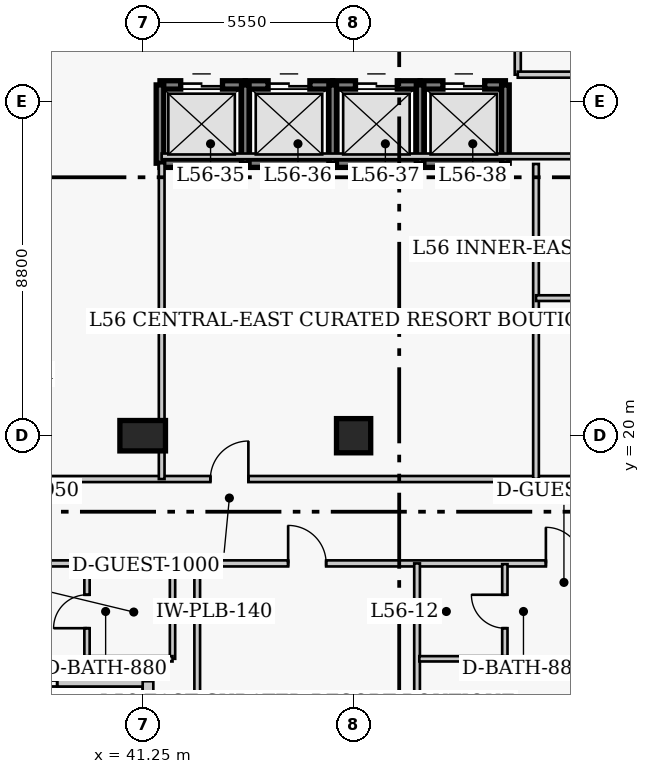
"""IFC4 building model, lengths in metres.
Left out: names, types, materials, properties, quantities, classifications, styles, units other than length and angle.
Written with IfcOpenShell. Run it as: python <this file> out.ifc"""

import sys

from ifc_helpers import new_model, si_unit, direction, frame, frame_2d, origin, origin_2d, place, context, subcontext, project, spatial, rectangle, extrude, element, fill, save


model = new_model("IFC4")
c1 = context("Model", 3, precision=1e-05, world=origin(), true_north=direction((0.0, 1.0)))
c2 = subcontext(c1, "Body", "Model", "MODEL_VIEW")
j1 = project(units=[si_unit("LENGTHUNIT", "METRE"), si_unit("PLANEANGLEUNIT", "RADIAN")], contexts=[c1])
p1 = place(None, origin())
s1 = spatial("IfcSite", under=j1, at=p1, CompositionType="ELEMENT")
p2 = place(p1, origin())
s2 = spatial("IfcBuilding", under=s1, at=p2, CompositionType="ELEMENT")
p3 = place(p2, frame((0.0, 0.0, 224.1)))
s3 = spatial("IfcBuildingStorey", under=s2, at=p3, CompositionType="ELEMENT", Elevation=224.1)
p4 = place(p3, frame((41.25, 20.0, 0.0), z_axis=(0.0, 0.0, 1.0), x_axis=(1.0, 0.0, 0.0)))
e1 = element("IfcColumn", 1, at=p4, inside=s3, PredefinedType="COLUMN", context=c2, shape_type="SweptSolid", body=[
    extrude(rectangle(XDim=1.2, YDim=0.8, at=origin_2d()), origin(), (0.0, 0.0, 1.0), 3.9),
])
p5 = place(p3, frame((46.8, 20.0, 0.0), z_axis=(0.0, 0.0, 1.0), x_axis=(1.0, 0.0, 0.0)))
e2 = element("IfcColumn", 2, at=p5, inside=s3, PredefinedType="COLUMN", context=c2, shape_type="SweptSolid", body=[
    extrude(rectangle(XDim=0.9, YDim=0.9, at=origin_2d()), origin(), (0.0, 0.0, 1.0), 3.9),
])
p6 = place(p3, frame((36.61, 13.54, 0.0), z_axis=(0.0, 0.0, 1.0), x_axis=(1.0, 0.0, 0.0)))
e3 = element("IfcWall", 3, at=p6, inside=s3, PredefinedType="SOLIDWALL", context=c2, shape_type="SweptSolid", body=[
    extrude(rectangle(XDim=4.78, YDim=0.28, at=frame_2d((2.39, 0.0))), origin(), (0.0, 0.0, 1.0), 3.65),
])
p7 = place(p6, frame((1.09, 0.0, 0.85)))
e4 = element("IfcOpeningElement", 4, at=p7, cuts=e3, PredefinedType="OPENING", context=c2, shape_type="SweptSolid", body=[
    extrude(rectangle(XDim=1.3, YDim=1.7, at=frame_2d((0.65, 0.85))), frame((0.0, 0.15, 0.0), z_axis=(0.0, -1.0, 0.0), x_axis=(1.0, 0.0, 0.0)), (0.0, 0.0, 1.0), 0.3),
])
p8 = place(p3, frame((41.39, 13.54, 0.0), z_axis=(0.0, 0.0, 1.0), x_axis=(0.0, -1.0, 0.0)))
e5 = element("IfcWall", 5, at=p8, inside=s3, PredefinedType="SOLIDWALL", context=c2, shape_type="SweptSolid", body=[
    extrude(rectangle(XDim=3.18, YDim=0.28, at=frame_2d((1.59, 0.0))), origin(), (0.0, 0.0, 1.0), 3.65),
])
p9 = place(p8, frame((0.94, 0.0, 0.85)))
e6 = element("IfcOpeningElement", 6, at=p9, cuts=e5, PredefinedType="OPENING", context=c2, shape_type="SweptSolid", body=[
    extrude(rectangle(XDim=1.3, YDim=1.7, at=frame_2d((0.65, 0.85))), frame((0.0, 0.15, 0.0), z_axis=(0.0, -1.0, 0.0), x_axis=(1.0, 0.0, 0.0)), (0.0, 0.0, 1.0), 0.3),
])
p10 = place(p3, frame((41.705, 29.23, 0.0), z_axis=(0.0, 0.0, 1.0), x_axis=(1.0, 0.0, 0.0)))
e7 = element("IfcWall", 7, at=p10, inside=s3, PredefinedType="SHEAR", context=c2, shape_type="SweptSolid", body=[
    extrude(rectangle(XDim=2.245, YDim=0.22, at=frame_2d((1.123, 0.0))), origin(), (0.0, 0.0, 1.0), 3.9),
])
p11 = place(p10, frame((0.545, 0.0, 0.0)))
e8 = element("IfcOpeningElement", 8, at=p11, cuts=e7, PredefinedType="OPENING", context=c2, shape_type="SweptSolid", body=[
    extrude(rectangle(XDim=1.1, YDim=2.15, at=frame_2d((0.55, 1.075))), frame((0.0, 0.12, 0.0), z_axis=(0.0, -1.0, 0.0), x_axis=(1.0, 0.0, 0.0)), (0.0, 0.0, 1.0), 0.24),
])
p12 = place(p3, frame((41.705, 27.17, 0.0), z_axis=(0.0, 0.0, 1.0), x_axis=(1.0, 0.0, 0.0)))
e9 = element("IfcWall", 9, at=p12, inside=s3, PredefinedType="SHEAR", context=c2, shape_type="SweptSolid", body=[
    extrude(rectangle(XDim=2.245, YDim=0.22, at=frame_2d((1.123, 0.0))), origin(), (0.0, 0.0, 1.0), 3.9),
])
p13 = place(p3, frame((41.705, 27.17, 0.0), z_axis=(0.0, 0.0, 1.0), x_axis=(0.0, 1.0, 0.0)))
e10 = element("IfcWall", 10, at=p13, inside=s3, PredefinedType="SHEAR", context=c2, shape_type="SweptSolid", body=[
    extrude(rectangle(XDim=2.06, YDim=0.2, at=frame_2d((1.03, 0.0))), origin(), (0.0, 0.0, 1.0), 3.9),
])
p14 = place(p3, frame((43.95, 29.23, 0.0), z_axis=(0.0, 0.0, 1.0), x_axis=(1.0, 0.0, 0.0)))
e11 = element("IfcWall", 11, at=p14, inside=s3, PredefinedType="SHEAR", context=c2, shape_type="SweptSolid", body=[
    extrude(rectangle(XDim=2.3, YDim=0.22, at=frame_2d((1.15, 0.0))), origin(), (0.0, 0.0, 1.0), 3.9),
])
p15 = place(p14, frame((0.6, 0.0, 0.0)))
e12 = element("IfcOpeningElement", 12, at=p15, cuts=e11, PredefinedType="OPENING", context=c2, shape_type="SweptSolid", body=[
    extrude(rectangle(XDim=1.1, YDim=2.15, at=frame_2d((0.55, 1.075))), frame((0.0, 0.12, 0.0), z_axis=(0.0, -1.0, 0.0), x_axis=(1.0, 0.0, 0.0)), (0.0, 0.0, 1.0), 0.24),
])
p16 = place(p3, frame((43.95, 27.17, 0.0), z_axis=(0.0, 0.0, 1.0), x_axis=(1.0, 0.0, 0.0)))
e13 = element("IfcWall", 13, at=p16, inside=s3, PredefinedType="SHEAR", context=c2, shape_type="SweptSolid", body=[
    extrude(rectangle(XDim=2.3, YDim=0.22, at=frame_2d((1.15, 0.0))), origin(), (0.0, 0.0, 1.0), 3.9),
])
p17 = place(p3, frame((43.95, 27.17, 0.0), z_axis=(0.0, 0.0, 1.0), x_axis=(0.0, 1.0, 0.0)))
e14 = element("IfcWall", 14, at=p17, inside=s3, PredefinedType="SHEAR", context=c2, shape_type="SweptSolid", body=[
    extrude(rectangle(XDim=2.06, YDim=0.2, at=frame_2d((1.03, 0.0))), origin(), (0.0, 0.0, 1.0), 3.9),
])
p18 = place(p3, frame((46.25, 29.23, 0.0), z_axis=(0.0, 0.0, 1.0), x_axis=(1.0, 0.0, 0.0)))
e15 = element("IfcWall", 15, at=p18, inside=s3, PredefinedType="SHEAR", context=c2, shape_type="SweptSolid", body=[
    extrude(rectangle(XDim=2.3, YDim=0.22, at=frame_2d((1.15, 0.0))), origin(), (0.0, 0.0, 1.0), 3.9),
])
p19 = place(p18, frame((0.6, 0.0, 0.0)))
e16 = element("IfcOpeningElement", 16, at=p19, cuts=e15, PredefinedType="OPENING", context=c2, shape_type="SweptSolid", body=[
    extrude(rectangle(XDim=1.1, YDim=2.15, at=frame_2d((0.55, 1.075))), frame((0.0, 0.12, 0.0), z_axis=(0.0, -1.0, 0.0), x_axis=(1.0, 0.0, 0.0)), (0.0, 0.0, 1.0), 0.24),
])
p20 = place(p3, frame((46.25, 27.17, 0.0), z_axis=(0.0, 0.0, 1.0), x_axis=(1.0, 0.0, 0.0)))
e17 = element("IfcWall", 17, at=p20, inside=s3, PredefinedType="SHEAR", context=c2, shape_type="SweptSolid", body=[
    extrude(rectangle(XDim=2.3, YDim=0.22, at=frame_2d((1.15, 0.0))), origin(), (0.0, 0.0, 1.0), 3.9),
])
p21 = place(p3, frame((46.25, 27.17, 0.0), z_axis=(0.0, 0.0, 1.0), x_axis=(0.0, 1.0, 0.0)))
e18 = element("IfcWall", 18, at=p21, inside=s3, PredefinedType="SHEAR", context=c2, shape_type="SweptSolid", body=[
    extrude(rectangle(XDim=2.06, YDim=0.2, at=frame_2d((1.03, 0.0))), origin(), (0.0, 0.0, 1.0), 3.9),
])
p22 = place(p3, frame((48.55, 29.23, 0.0), z_axis=(0.0, 0.0, 1.0), x_axis=(1.0, 0.0, 0.0)))
e19 = element("IfcWall", 19, at=p22, inside=s3, PredefinedType="SHEAR", context=c2, shape_type="SweptSolid", body=[
    extrude(rectangle(XDim=2.245, YDim=0.22, at=frame_2d((1.123, 0.0))), origin(), (0.0, 0.0, 1.0), 3.9),
])
p23 = place(p22, frame((0.6, 0.0, 0.0)))
e20 = element("IfcOpeningElement", 20, at=p23, cuts=e19, PredefinedType="OPENING", context=c2, shape_type="SweptSolid", body=[
    extrude(rectangle(XDim=1.1, YDim=2.15, at=frame_2d((0.55, 1.075))), frame((0.0, 0.12, 0.0), z_axis=(0.0, -1.0, 0.0), x_axis=(1.0, 0.0, 0.0)), (0.0, 0.0, 1.0), 0.24),
])
p24 = place(p3, frame((48.55, 27.17, 0.0), z_axis=(0.0, 0.0, 1.0), x_axis=(1.0, 0.0, 0.0)))
e21 = element("IfcWall", 21, at=p24, inside=s3, PredefinedType="SHEAR", context=c2, shape_type="SweptSolid", body=[
    extrude(rectangle(XDim=2.245, YDim=0.22, at=frame_2d((1.123, 0.0))), origin(), (0.0, 0.0, 1.0), 3.9),
])
for number, where, z_axis, x_axis in (
    (22, (48.55, 27.17, 0.0), (0.0, 0.0, 1.0), (0.0, 1.0, 0.0)),
    (23, (50.795, 27.17, 0.0), (0.0, 0.0, 1.0), (0.0, 1.0, 0.0)),
):
    element("IfcWall", number, at=place(p3, frame(where, z_axis=z_axis, x_axis=x_axis)), inside=s3, PredefinedType="SHEAR", context=c2, shape_type="SweptSolid", body=[
        extrude(rectangle(XDim=2.06, YDim=0.2, at=frame_2d((1.03, 0.0))), origin(), (0.0, 0.0, 1.0), 3.9),
    ])
p25 = place(p3, frame((51.12, 29.5, 0.0), z_axis=(0.0, 0.0, 1.0), x_axis=(0.0, 1.0, 0.0)))
e24 = element("IfcWall", 24, at=p25, inside=s3, PredefinedType="PARTITIONING", context=c2, shape_type="SweptSolid", body=[
    extrude(rectangle(XDim=3.7, YDim=0.16, at=frame_2d((1.85, 0.0))), origin(), (0.0, 0.0, 1.0), 3.65),
])
p26 = place(p25, frame((0.9, 0.0, 0.0)))
e25 = element("IfcOpeningElement", 25, at=p26, cuts=e24, PredefinedType="OPENING", context=c2, shape_type="SweptSolid", body=[
    extrude(rectangle(XDim=1.1, YDim=2.15, at=frame_2d((0.55, 1.075))), frame((0.0, 0.09, 0.0), z_axis=(0.0, -1.0, 0.0), x_axis=(1.0, 0.0, 0.0)), (0.0, 0.0, 1.0), 0.18),
])
p27 = place(p3, frame((51.12, 29.5, 0.0), z_axis=(0.0, 0.0, 1.0), x_axis=(1.0, 0.0, 0.0)))
e26 = element("IfcWall", 26, at=p27, inside=s3, PredefinedType="PARTITIONING", context=c2, shape_type="SweptSolid", body=[
    extrude(rectangle(XDim=5.63, YDim=0.16, at=frame_2d((2.815, 0.0))), origin(), (0.0, 0.0, 1.0), 3.65),
])
p28 = place(p3, frame((35.85, 18.86, 0.0), z_axis=(0.0, 0.0, 1.0), x_axis=(1.0, 0.0, 0.0)))
e27 = element("IfcWall", 27, at=p28, inside=s3, PredefinedType="PARTITIONING", context=c2, shape_type="SweptSolid", body=[
    extrude(rectangle(XDim=23.15, YDim=0.16, at=frame_2d((11.575, 0.0))), origin(), (0.0, 0.0, 1.0), 3.65),
])
p29 = place(p28, frame((7.181, 0.0, 0.0)))
e28 = element("IfcOpeningElement", 28, at=p29, cuts=e27, PredefinedType="OPENING", context=c2, shape_type="SweptSolid", body=[
    extrude(rectangle(XDim=1.0, YDim=2.15, at=frame_2d((0.5, 1.075))), frame((0.0, 0.09, 0.0), z_axis=(0.0, -1.0, 0.0), x_axis=(1.0, 0.0, 0.0)), (0.0, 0.0, 1.0), 0.18),
])
p30 = place(p28, frame((20.43, 0.0, 0.0)))
e29 = element("IfcOpeningElement", 29, at=p30, cuts=e27, PredefinedType="OPENING", context=c2, shape_type="SweptSolid", body=[
    extrude(rectangle(XDim=1.0, YDim=2.15, at=frame_2d((0.5, 1.075))), frame((0.0, 0.09, 0.0), z_axis=(0.0, -1.0, 0.0), x_axis=(1.0, 0.0, 0.0)), (0.0, 0.0, 1.0), 0.18),
])
p31 = place(p3, frame((35.8, 16.64, 0.0), z_axis=(0.0, 0.0, 1.0), x_axis=(1.0, 0.0, 0.0)))
e30 = element("IfcWall", 30, at=p31, inside=s3, PredefinedType="PARTITIONING", context=c2, shape_type="SweptSolid", body=[
    extrude(rectangle(XDim=23.2, YDim=0.16, at=frame_2d((11.6, 0.0))), origin(), (0.0, 0.0, 1.0), 3.65),
])
p32 = place(p31, frame((1.518, 0.0, 0.0)))
e31 = element("IfcOpeningElement", 31, at=p32, cuts=e30, PredefinedType="OPENING", context=c2, shape_type="SweptSolid", body=[
    extrude(rectangle(XDim=0.95, YDim=2.1, at=frame_2d((0.475, 1.05))), frame((0.0, 0.09, 0.0), z_axis=(0.0, -1.0, 0.0), x_axis=(1.0, 0.0, 0.0)), (0.0, 0.0, 1.0), 0.18),
])
p33 = place(p31, frame((9.278, 0.0, 0.0)))
e32 = element("IfcOpeningElement", 32, at=p33, cuts=e30, PredefinedType="OPENING", context=c2, shape_type="SweptSolid", body=[
    extrude(rectangle(XDim=1.0, YDim=2.15, at=frame_2d((0.5, 1.075))), frame((0.0, 0.09, 0.0), z_axis=(0.0, -1.0, 0.0), x_axis=(1.0, 0.0, 0.0)), (0.0, 0.0, 1.0), 0.18),
])
p34 = place(p31, frame((16.06, 0.0, 0.0)))
e33 = element("IfcOpeningElement", 33, at=p34, cuts=e30, PredefinedType="OPENING", context=c2, shape_type="SweptSolid", body=[
    extrude(rectangle(XDim=0.95, YDim=2.1, at=frame_2d((0.475, 1.05))), frame((0.0, 0.09, 0.0), z_axis=(0.0, -1.0, 0.0), x_axis=(1.0, 0.0, 0.0)), (0.0, 0.0, 1.0), 0.18),
])
p35 = place(p31, frame((18.985, 0.0, 0.0)))
e34 = element("IfcOpeningElement", 34, at=p35, cuts=e30, PredefinedType="OPENING", context=c2, shape_type="SweptSolid", body=[
    extrude(rectangle(XDim=0.95, YDim=2.1, at=frame_2d((0.475, 1.05))), frame((0.0, 0.09, 0.0), z_axis=(0.0, -1.0, 0.0), x_axis=(1.0, 0.0, 0.0)), (0.0, 0.0, 1.0), 0.18),
])
p36 = place(p3, frame((41.75, 18.86, 0.0), z_axis=(0.0, 0.0, 1.0), x_axis=(0.0, 1.0, 0.0)))
e35 = element("IfcWall", 35, at=p36, inside=s3, PredefinedType="PARTITIONING", context=c2, shape_type="SweptSolid", body=[
    extrude(rectangle(XDim=8.31, YDim=0.15, at=frame_2d((4.155, 0.0))), origin(), (0.0, 0.0, 1.0), 3.65),
])
p37 = place(p3, frame((51.6, 18.86, 0.0), z_axis=(0.0, 0.0, 1.0), x_axis=(0.0, 1.0, 0.0)))
e36 = element("IfcWall", 36, at=p37, inside=s3, PredefinedType="PARTITIONING", context=c2, shape_type="SweptSolid", body=[
    extrude(rectangle(XDim=8.29, YDim=0.15, at=frame_2d((4.145, 0.0))), origin(), (0.0, 0.0, 1.0), 3.65),
])
p38 = place(p3, frame((41.75, 27.35, 0.0), z_axis=(0.0, 0.0, 1.0), x_axis=(1.0, 0.0, 0.0)))
e37 = element("IfcWall", 37, at=p38, inside=s3, PredefinedType="PARTITIONING", context=c2, shape_type="SweptSolid", body=[
    extrude(rectangle(XDim=17.19, YDim=0.15, at=frame_2d((8.595, 0.0))), origin(), (0.0, 0.0, 1.0), 3.65),
])
p39 = place(p3, frame((51.6, 23.62, 0.0), z_axis=(0.0, 0.0, 1.0), x_axis=(1.0, 0.0, 0.0)))
e38 = element("IfcWall", 38, at=p39, inside=s3, PredefinedType="PARTITIONING", context=c2, shape_type="SweptSolid", body=[
    extrude(rectangle(XDim=7.34, YDim=0.15, at=frame_2d((3.67, 0.0))), origin(), (0.0, 0.0, 1.0), 3.65),
])
p40 = place(p3, frame((39.785, 14.13, 0.0), z_axis=(0.0, 0.0, 1.0), x_axis=(0.0, 1.0, 0.0)))
e39 = element("IfcWall", 39, at=p40, inside=s3, PredefinedType="PLUMBINGWALL", context=c2, shape_type="SweptSolid", body=[
    extrude(rectangle(XDim=2.49, YDim=0.14, at=frame_2d((1.245, 0.0))), origin(), (0.0, 0.0, 1.0), 3.65),
])
p41 = place(p40, frame((0.805, 0.0, 0.0)))
e40 = element("IfcOpeningElement", 40, at=p41, cuts=e39, PredefinedType="OPENING", context=c2, shape_type="SweptSolid", body=[
    extrude(rectangle(XDim=0.88, YDim=2.05, at=frame_2d((0.44, 1.025))), frame((0.0, 0.08, 0.0), z_axis=(0.0, -1.0, 0.0), x_axis=(1.0, 0.0, 0.0)), (0.0, 0.0, 1.0), 0.16),
])
p42 = place(p3, frame((42.035, 14.13, 0.0), z_axis=(0.0, 0.0, 1.0), x_axis=(0.0, 1.0, 0.0)))
e41 = element("IfcWall", 41, at=p42, inside=s3, PredefinedType="PLUMBINGWALL", context=c2, shape_type="SweptSolid", body=[
    extrude(rectangle(XDim=2.49, YDim=0.14, at=frame_2d((1.245, 0.0))), origin(), (0.0, 0.0, 1.0), 3.65),
])
p43 = place(p3, frame((39.785, 14.13, 0.0), z_axis=(0.0, 0.0, 1.0), x_axis=(1.0, 0.0, 0.0)))
e42 = element("IfcWall", 42, at=p43, inside=s3, PredefinedType="PLUMBINGWALL", context=c2, shape_type="SweptSolid", body=[
    extrude(rectangle(XDim=2.25, YDim=0.14, at=frame_2d((1.125, 0.0))), origin(), (0.0, 0.0, 1.0), 3.65),
])
for number, where, z_axis, x_axis in (
    (43, (42.685, 9.92, 0.0), (0.0, 0.0, 1.0), (0.0, 1.0, 0.0)),
    (44, (48.47, 9.92, 0.0), (0.0, 0.0, 1.0), (0.0, 1.0, 0.0)),
):
    element("IfcWall", number, at=place(p3, frame(where, z_axis=z_axis, x_axis=x_axis)), inside=s3, PredefinedType="PARTITIONING", context=c2, shape_type="SweptSolid", body=[
        extrude(rectangle(XDim=6.72, YDim=0.15, at=frame_2d((3.36, 0.0))), origin(), (0.0, 0.0, 1.0), 3.65),
    ])
p44 = place(p3, frame((50.78, 14.13, 0.0), z_axis=(0.0, 0.0, 1.0), x_axis=(0.0, 1.0, 0.0)))
e45 = element("IfcWall", 45, at=p44, inside=s3, PredefinedType="PLUMBINGWALL", context=c2, shape_type="SweptSolid", body=[
    extrude(rectangle(XDim=2.49, YDim=0.14, at=frame_2d((1.245, 0.0))), origin(), (0.0, 0.0, 1.0), 3.246),
])
p45 = place(p44, frame((0.805, 0.0, 0.0)))
e46 = element("IfcOpeningElement", 46, at=p45, cuts=e45, PredefinedType="OPENING", context=c2, shape_type="SweptSolid", body=[
    extrude(rectangle(XDim=0.88, YDim=2.05, at=frame_2d((0.44, 1.025))), frame((0.0, 0.08, 0.0), z_axis=(0.0, -1.0, 0.0), x_axis=(1.0, 0.0, 0.0)), (0.0, 0.0, 1.0), 0.16),
])
p46 = place(p3, frame((48.53, 14.13, 0.0), z_axis=(0.0, 0.0, 1.0), x_axis=(1.0, 0.0, 0.0)))
e47 = element("IfcWall", 47, at=p46, inside=s3, PredefinedType="PLUMBINGWALL", context=c2, shape_type="SweptSolid", body=[
    extrude(rectangle(XDim=2.25, YDim=0.14, at=frame_2d((1.125, 0.0))), origin(), (0.0, 0.0, 1.0), 3.65),
])
p47 = place(p7, origin())
e48 = element("IfcWindow", 48, at=p47, inside=s3, PartitioningType="SINGLE_PANEL", PredefinedType="WINDOW", context=c2, shape_type="SweptSolid", body=[
    extrude(rectangle(XDim=1.3, YDim=1.7, at=frame_2d((0.65, 0.85))), frame((0.0, 0.03, 0.0), z_axis=(0.0, -1.0, 0.0), x_axis=(1.0, 0.0, 0.0)), (0.0, 0.0, 1.0), 0.06),
])
fill(e4, e48)
p48 = place(p11, origin())
e49 = element("IfcDoor", 49, at=p48, inside=s3, OperationType="DOUBLE_DOOR_SLIDING", PredefinedType="DOOR", context=c2, shape_type="SweptSolid", body=[
    extrude(rectangle(XDim=1.1, YDim=2.15, at=frame_2d((0.55, 1.075))), frame((0.0, 0.025, 0.0), z_axis=(0.0, -1.0, 0.0), x_axis=(1.0, 0.0, 0.0)), (0.0, 0.0, 1.0), 0.05),
])
fill(e8, e49)
p49 = place(p15, origin())
e50 = element("IfcDoor", 50, at=p49, inside=s3, OperationType="DOUBLE_DOOR_SLIDING", PredefinedType="DOOR", context=c2, shape_type="SweptSolid", body=[
    extrude(rectangle(XDim=1.1, YDim=2.15, at=frame_2d((0.55, 1.075))), frame((0.0, 0.025, 0.0), z_axis=(0.0, -1.0, 0.0), x_axis=(1.0, 0.0, 0.0)), (0.0, 0.0, 1.0), 0.05),
])
fill(e12, e50)
p50 = place(p19, origin())
e51 = element("IfcDoor", 51, at=p50, inside=s3, OperationType="DOUBLE_DOOR_SLIDING", PredefinedType="DOOR", context=c2, shape_type="SweptSolid", body=[
    extrude(rectangle(XDim=1.1, YDim=2.15, at=frame_2d((0.55, 1.075))), frame((0.0, 0.025, 0.0), z_axis=(0.0, -1.0, 0.0), x_axis=(1.0, 0.0, 0.0)), (0.0, 0.0, 1.0), 0.05),
])
fill(e16, e51)
p51 = place(p23, origin())
e52 = element("IfcDoor", 52, at=p51, inside=s3, OperationType="DOUBLE_DOOR_SLIDING", PredefinedType="DOOR", context=c2, shape_type="SweptSolid", body=[
    extrude(rectangle(XDim=1.1, YDim=2.15, at=frame_2d((0.55, 1.075))), frame((0.0, 0.025, 0.0), z_axis=(0.0, -1.0, 0.0), x_axis=(1.0, 0.0, 0.0)), (0.0, 0.0, 1.0), 0.05),
])
fill(e20, e52)
p52 = place(p29, origin())
e53 = element("IfcDoor", 53, at=p52, inside=s3, OperationType="SINGLE_SWING_RIGHT", PredefinedType="DOOR", context=c2, shape_type="SweptSolid", body=[
    extrude(rectangle(XDim=1.0, YDim=2.15, at=frame_2d((0.5, 1.075))), frame((0.0, 0.025, 0.0), z_axis=(0.0, -1.0, 0.0), x_axis=(1.0, 0.0, 0.0)), (0.0, 0.0, 1.0), 0.05),
])
fill(e28, e53)
p53 = place(p41, origin())
e54 = element("IfcDoor", 54, at=p53, inside=s3, OperationType="SINGLE_SWING_LEFT", PredefinedType="DOOR", context=c2, shape_type="SweptSolid", body=[
    extrude(rectangle(XDim=0.88, YDim=2.05, at=frame_2d((0.44, 1.025))), frame((0.0, 0.025, 0.0), z_axis=(0.0, -1.0, 0.0), x_axis=(1.0, 0.0, 0.0)), (0.0, 0.0, 1.0), 0.05),
])
fill(e40, e54)
p54 = place(p33, origin())
e55 = element("IfcDoor", 55, at=p54, inside=s3, OperationType="SINGLE_SWING_LEFT", PredefinedType="DOOR", context=c2, shape_type="SweptSolid", body=[
    extrude(rectangle(XDim=1.0, YDim=2.15, at=frame_2d((0.5, 1.075))), frame((0.0, 0.025, 0.0), z_axis=(0.0, -1.0, 0.0), x_axis=(1.0, 0.0, 0.0)), (0.0, 0.0, 1.0), 0.05),
])
fill(e32, e55)
p55 = place(p45, origin())
e56 = element("IfcDoor", 56, at=p55, inside=s3, OperationType="SINGLE_SWING_RIGHT", PredefinedType="DOOR", context=c2, shape_type="SweptSolid", body=[
    extrude(rectangle(XDim=0.88, YDim=2.05, at=frame_2d((0.44, 1.025))), frame((0.0, 0.025, 0.0), z_axis=(0.0, -1.0, 0.0), x_axis=(1.0, 0.0, 0.0)), (0.0, 0.0, 1.0), 0.05),
])
fill(e46, e56)
p56 = place(p34, origin())
e57 = element("IfcDoor", 57, at=p56, inside=s3, OperationType="SINGLE_SWING_LEFT", PredefinedType="DOOR", context=c2, shape_type="SweptSolid", body=[
    extrude(rectangle(XDim=0.95, YDim=2.1, at=frame_2d((0.475, 1.05))), frame((0.0, 0.025, 0.0), z_axis=(0.0, -1.0, 0.0), x_axis=(1.0, 0.0, 0.0)), (0.0, 0.0, 1.0), 0.05),
])
fill(e33, e57)
save(model, sys.argv[1])
